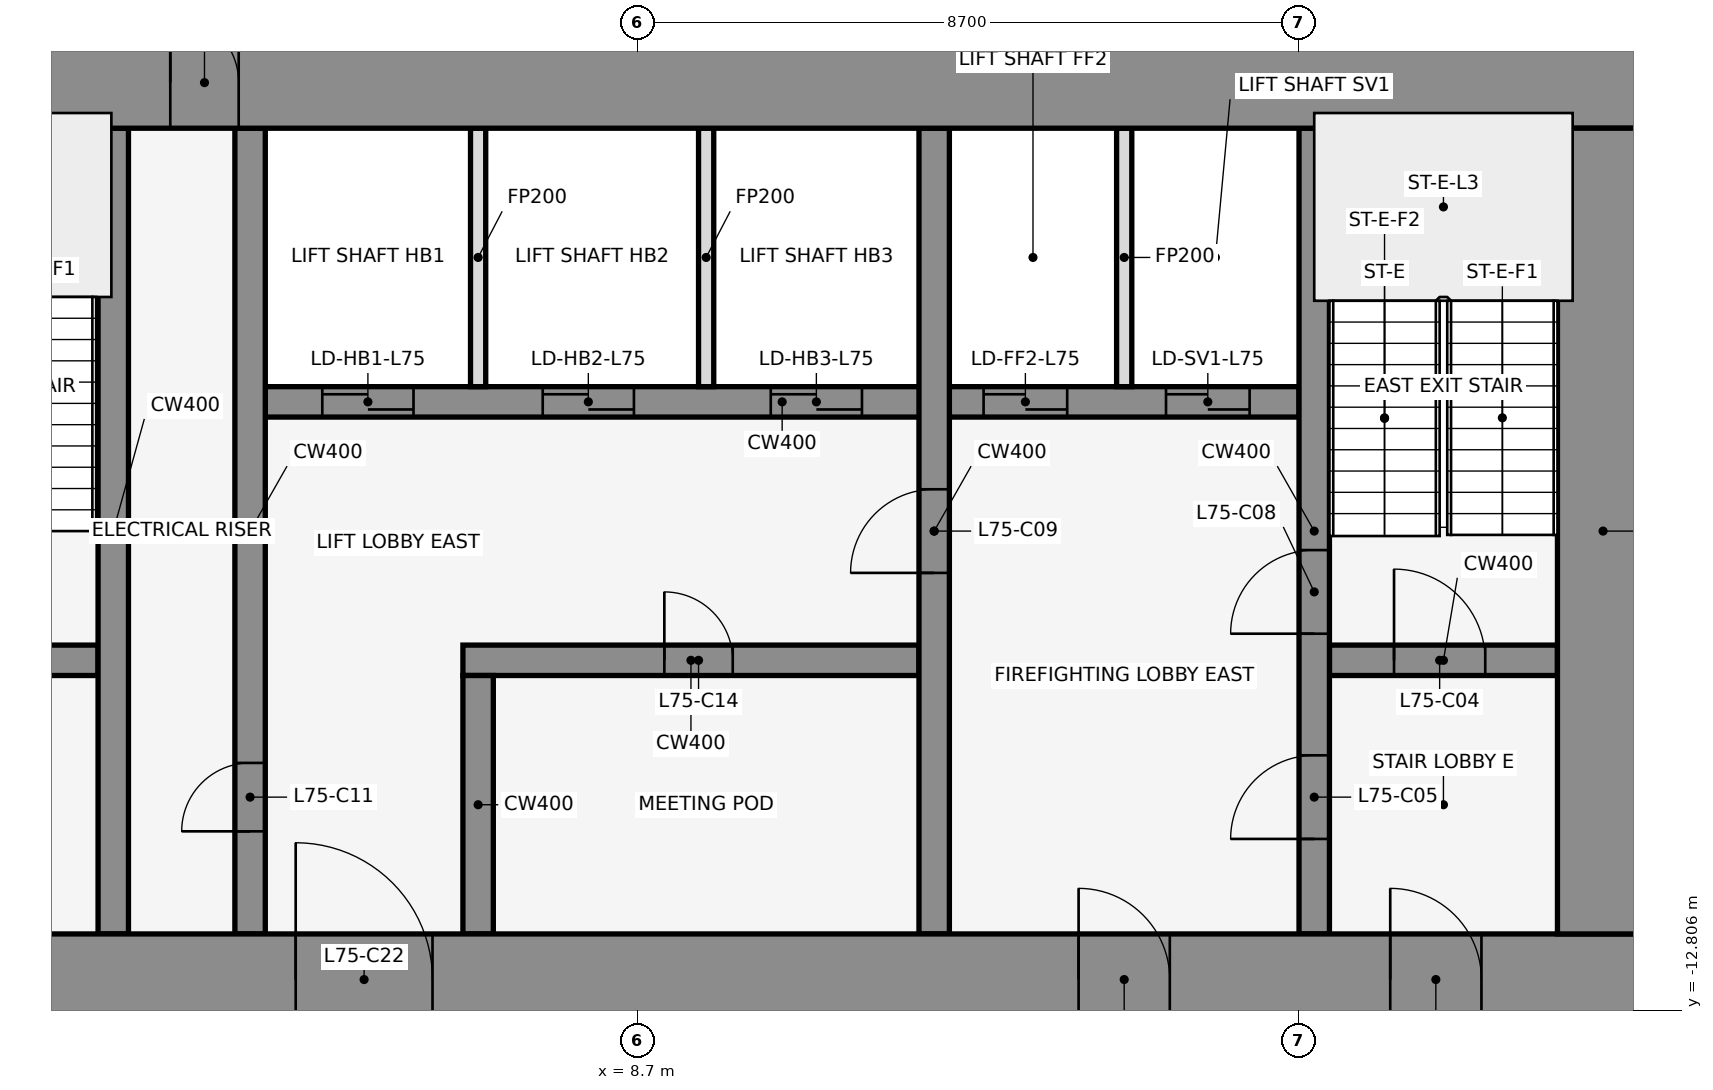
"""IFC4 building model, lengths in metres.
Left out: names, types, materials, properties, quantities, classifications, styles, units other than length and angle.
Written with IfcOpenShell. Run it as: python <this file> out.ifc"""

import sys

from ifc_helpers import new_model, si_unit, direction, frame, frame_2d, origin, place, context, subcontext, project, spatial, rectangle, extrude, element, fill, save


model = new_model("IFC4")
c1 = context("Model", 3, precision=1e-05, world=origin(), true_north=direction((0.0, 1.0)))
c2 = subcontext(c1, "Body", "Model", "MODEL_VIEW")
j1 = project(units=[si_unit("LENGTHUNIT", "METRE"), si_unit("PLANEANGLEUNIT", "RADIAN")], contexts=[c1])
p1 = place(None, origin())
s1 = spatial("IfcSite", under=j1, at=p1, CompositionType="ELEMENT")
p2 = place(p1, origin())
s2 = spatial("IfcBuilding", under=s1, at=p2, CompositionType="ELEMENT")
p3 = place(p2, frame((0.0, 0.0, 333.5)))
s3 = spatial("IfcBuildingStorey", under=s2, at=p3, CompositionType="ELEMENT", Elevation=333.5)
for number, where, z_axis, x_axis in (
    (1, (16.432, -0.105, 0.0), (0.0, 0.0, 1.0), (-0.84, 0.543, 0.0)),
    (2, (1.901, 1.08, 0.0), (0.0, 0.0, 1.0), (-0.84, -0.543, 0.0)),
):
    element("IfcWall", number, at=place(p3, frame(where, z_axis=z_axis, x_axis=x_axis)), inside=s3, PredefinedType="STANDARD", context=c2, shape_type="SweptSolid", body=[
        extrude(rectangle(XDim=2.183, YDim=0.25, at=frame_2d((1.091, 0.0))), origin(), (0.0, 0.0, 1.0), 4.35),
    ])
p4 = place(p3, frame((-1.6, -8.2, 0.0), z_axis=(0.0, 0.0, 1.0), x_axis=(1.0, 0.0, 0.0)))
e3 = element("IfcWall", 3, at=p4, inside=s3, PredefinedType="SHEAR", context=c2, shape_type="SweptSolid", body=[
    extrude(rectangle(XDim=3.2, YDim=0.4, at=frame_2d((1.6, 0.0))), origin(), (0.0, 0.0, 1.0), 4.5),
])
p5 = place(p4, frame((1.05, 0.0, 0.0)))
e4 = element("IfcOpeningElement", 4, at=p5, cuts=e3, PredefinedType="OPENING", context=c2, shape_type="SweptSolid", body=[
    extrude(rectangle(XDim=1.2, YDim=2.1, at=frame_2d((0.6, 1.05))), frame((0.0, 0.212, 0.0), z_axis=(0.0, -1.0, 0.0), x_axis=(1.0, 0.0, 0.0)), (0.0, 0.0, 1.0), 0.424),
])
p6 = place(p3, frame((6.4, -8.2, 0.0), z_axis=(0.0, 0.0, 1.0), x_axis=(1.0, 0.0, 0.0)))
e5 = element("IfcWall", 5, at=p6, inside=s3, PredefinedType="SHEAR", context=c2, shape_type="SweptSolid", body=[
    extrude(rectangle(XDim=6.0, YDim=0.4, at=frame_2d((3.0, 0.0))), origin(), (0.0, 0.0, 1.0), 4.5),
])
p7 = place(p6, frame((2.65, 0.0, 0.0)))
e6 = element("IfcOpeningElement", 6, at=p7, cuts=e5, PredefinedType="OPENING", context=c2, shape_type="SweptSolid", body=[
    extrude(rectangle(XDim=0.9, YDim=2.1, at=frame_2d((0.45, 1.05))), frame((0.0, 0.212, 0.0), z_axis=(0.0, -1.0, 0.0), x_axis=(1.0, 0.0, 0.0)), (0.0, 0.0, 1.0), 0.424),
])
p8 = place(p3, frame((17.8, -8.2, 0.0), z_axis=(0.0, 0.0, 1.0), x_axis=(1.0, 0.0, 0.0)))
e7 = element("IfcWall", 7, at=p8, inside=s3, PredefinedType="SHEAR", context=c2, shape_type="SweptSolid", body=[
    extrude(rectangle(XDim=3.0, YDim=0.4, at=frame_2d((1.5, 0.0))), origin(), (0.0, 0.0, 1.0), 4.5),
])
p9 = place(p8, frame((0.85, 0.0, 0.0)))
e8 = element("IfcOpeningElement", 8, at=p9, cuts=e7, PredefinedType="OPENING", context=c2, shape_type="SweptSolid", body=[
    extrude(rectangle(XDim=1.2, YDim=2.1, at=frame_2d((0.6, 1.05))), frame((0.0, 0.212, 0.0), z_axis=(0.0, -1.0, 0.0), x_axis=(1.0, 0.0, 0.0)), (0.0, 0.0, 1.0), 0.424),
])
p10 = place(p3, frame((3.8, -4.8, 0.0), z_axis=(0.0, 0.0, 1.0), x_axis=(1.0, 0.0, 0.0)))
e9 = element("IfcWall", 9, at=p10, inside=s3, PredefinedType="SHEAR", context=c2, shape_type="SweptSolid", body=[
    extrude(rectangle(XDim=13.6, YDim=0.4, at=frame_2d((6.8, 0.0))), origin(), (0.0, 0.0, 1.0), 4.5),
])
p11 = place(p10, frame((0.75, 0.0, 0.0)))
e10 = element("IfcOpeningElement", 10, at=p11, cuts=e9, PredefinedType="OPENING", context=c2, shape_type="SweptSolid", body=[
    extrude(rectangle(XDim=1.2, YDim=2.1, at=frame_2d((0.6, 1.05))), frame((0.0, 0.212, 0.0), z_axis=(0.0, -1.0, 0.0), x_axis=(1.0, 0.0, 0.0)), (0.0, 0.0, 1.0), 0.424),
])
p12 = place(p10, frame((3.65, 0.0, 0.0)))
e11 = element("IfcOpeningElement", 11, at=p12, cuts=e9, PredefinedType="OPENING", context=c2, shape_type="SweptSolid", body=[
    extrude(rectangle(XDim=1.2, YDim=2.1, at=frame_2d((0.6, 1.05))), frame((0.0, 0.212, 0.0), z_axis=(0.0, -1.0, 0.0), x_axis=(1.0, 0.0, 0.0)), (0.0, 0.0, 1.0), 0.424),
])
p13 = place(p10, frame((6.65, 0.0, 0.0)))
e12 = element("IfcOpeningElement", 12, at=p13, cuts=e9, PredefinedType="OPENING", context=c2, shape_type="SweptSolid", body=[
    extrude(rectangle(XDim=1.2, YDim=2.1, at=frame_2d((0.6, 1.05))), frame((0.0, 0.212, 0.0), z_axis=(0.0, -1.0, 0.0), x_axis=(1.0, 0.0, 0.0)), (0.0, 0.0, 1.0), 0.424),
])
p14 = place(p10, frame((9.45, 0.0, 0.0)))
e13 = element("IfcOpeningElement", 13, at=p14, cuts=e9, PredefinedType="OPENING", context=c2, shape_type="SweptSolid", body=[
    extrude(rectangle(XDim=1.1, YDim=2.1, at=frame_2d((0.55, 1.05))), frame((0.0, 0.212, 0.0), z_axis=(0.0, -1.0, 0.0), x_axis=(1.0, 0.0, 0.0)), (0.0, 0.0, 1.0), 0.424),
])
p15 = place(p10, frame((11.85, 0.0, 0.0)))
e14 = element("IfcOpeningElement", 14, at=p15, cuts=e9, PredefinedType="OPENING", context=c2, shape_type="SweptSolid", body=[
    extrude(rectangle(XDim=1.1, YDim=2.1, at=frame_2d((0.55, 1.05))), frame((0.0, 0.212, 0.0), z_axis=(0.0, -1.0, 0.0), x_axis=(1.0, 0.0, 0.0)), (0.0, 0.0, 1.0), 0.424),
])
p16 = place(p3, frame((1.8, -11.8, 0.0), z_axis=(0.0, 0.0, 1.0), x_axis=(0.0, 1.0, 0.0)))
e15 = element("IfcWall", 15, at=p16, inside=s3, PredefinedType="SHEAR", context=c2, shape_type="SweptSolid", body=[
    extrude(rectangle(XDim=10.6, YDim=0.4, at=frame_2d((5.3, 0.0))), origin(), (0.0, 0.0, 1.0), 4.5),
])
p17 = place(p3, frame((3.6, -11.8, 0.0), z_axis=(0.0, 0.0, 1.0), x_axis=(0.0, 1.0, 0.0)))
e16 = element("IfcWall", 16, at=p17, inside=s3, PredefinedType="SHEAR", context=c2, shape_type="SweptSolid", body=[
    extrude(rectangle(XDim=10.6, YDim=0.4, at=frame_2d((5.3, 0.0))), origin(), (0.0, 0.0, 1.0), 4.5),
])
p18 = place(p17, frame((1.35, 0.0, 0.0)))
e17 = element("IfcOpeningElement", 17, at=p18, cuts=e16, PredefinedType="OPENING", context=c2, shape_type="SweptSolid", body=[
    extrude(rectangle(XDim=0.9, YDim=2.1, at=frame_2d((0.45, 1.05))), frame((0.0, 0.212, 0.0), z_axis=(0.0, -1.0, 0.0), x_axis=(1.0, 0.0, 0.0)), (0.0, 0.0, 1.0), 0.424),
])
p19 = place(p3, frame((6.6, -11.8, 0.0), z_axis=(0.0, 0.0, 1.0), x_axis=(0.0, 1.0, 0.0)))
e18 = element("IfcWall", 18, at=p19, inside=s3, PredefinedType="SHEAR", context=c2, shape_type="SweptSolid", body=[
    extrude(rectangle(XDim=3.4, YDim=0.4, at=frame_2d((1.7, 0.0))), origin(), (0.0, 0.0, 1.0), 4.5),
])
for number, where, z_axis, x_axis in (
    (19, (6.6, -4.6, 0.0), (0.0, 0.0, 1.0), (0.0, 1.0, 0.0)),
    (20, (9.6, -4.6, 0.0), (0.0, 0.0, 1.0), (0.0, 1.0, 0.0)),
):
    element("IfcWall", number, at=place(p3, frame(where, z_axis=z_axis, x_axis=x_axis)), inside=s3, PredefinedType="PARTITIONING", context=c2, shape_type="SweptSolid", body=[
        extrude(rectangle(XDim=3.4, YDim=0.2, at=frame_2d((1.7, 0.0))), origin(), (0.0, 0.0, 1.0), 3.339),
    ])
p20 = place(p3, frame((12.6, -11.8, 0.0), z_axis=(0.0, 0.0, 1.0), x_axis=(0.0, 1.0, 0.0)))
e21 = element("IfcWall", 21, at=p20, inside=s3, PredefinedType="SHEAR", context=c2, shape_type="SweptSolid", body=[
    extrude(rectangle(XDim=10.6, YDim=0.4, at=frame_2d((5.3, 0.0))), origin(), (0.0, 0.0, 1.0), 4.5),
])
p21 = place(p20, frame((4.75, 0.0, 0.0)))
e22 = element("IfcOpeningElement", 22, at=p21, cuts=e21, PredefinedType="OPENING", context=c2, shape_type="SweptSolid", body=[
    extrude(rectangle(XDim=1.1, YDim=2.1, at=frame_2d((0.55, 1.05))), frame((0.0, 0.212, 0.0), z_axis=(0.0, -1.0, 0.0), x_axis=(1.0, 0.0, 0.0)), (0.0, 0.0, 1.0), 0.424),
])
p22 = place(p3, frame((15.1, -4.6, 0.0), z_axis=(0.0, 0.0, 1.0), x_axis=(0.0, 1.0, 0.0)))
e23 = element("IfcWall", 23, at=p22, inside=s3, PredefinedType="PARTITIONING", context=c2, shape_type="SweptSolid", body=[
    extrude(rectangle(XDim=3.4, YDim=0.2, at=frame_2d((1.7, 0.0))), origin(), (0.0, 0.0, 1.0), 3.339),
])
p23 = place(p3, frame((17.6, -11.8, 0.0), z_axis=(0.0, 0.0, 1.0), x_axis=(0.0, 1.0, 0.0)))
e24 = element("IfcWall", 24, at=p23, inside=s3, PredefinedType="SHEAR", context=c2, shape_type="SweptSolid", body=[
    extrude(rectangle(XDim=10.6, YDim=0.4, at=frame_2d((5.3, 0.0))), origin(), (0.0, 0.0, 1.0), 4.5),
])
p24 = place(p23, frame((1.25, 0.0, 0.0)))
e25 = element("IfcOpeningElement", 25, at=p24, cuts=e24, PredefinedType="OPENING", context=c2, shape_type="SweptSolid", body=[
    extrude(rectangle(XDim=1.1, YDim=2.1, at=frame_2d((0.55, 1.05))), frame((0.0, 0.212, 0.0), z_axis=(0.0, -1.0, 0.0), x_axis=(1.0, 0.0, 0.0)), (0.0, 0.0, 1.0), 0.424),
])
p25 = place(p23, frame((3.95, 0.0, 0.0)))
e26 = element("IfcOpeningElement", 26, at=p25, cuts=e24, PredefinedType="OPENING", context=c2, shape_type="SweptSolid", body=[
    extrude(rectangle(XDim=1.1, YDim=2.1, at=frame_2d((0.55, 1.05))), frame((0.0, 0.212, 0.0), z_axis=(0.0, -1.0, 0.0), x_axis=(1.0, 0.0, 0.0)), (0.0, 0.0, 1.0), 0.424),
])
p26 = place(p3, frame((-22.0, -0.6, 0.0), z_axis=(0.0, 0.0, 1.0), x_axis=(1.0, 0.0, 0.0)))
e27 = element("IfcWall", 27, at=p26, inside=s3, PredefinedType="SHEAR", context=c2, shape_type="SweptSolid", body=[
    extrude(rectangle(XDim=44.0, YDim=1.2, at=frame_2d((22.0, 0.0))), origin(), (0.0, 0.0, 1.0), 4.5),
])
p27 = place(p26, frame((18.55, 0.0, 0.0)))
e28 = element("IfcOpeningElement", 28, at=p27, cuts=e27, PredefinedType="OPENING", context=c2, shape_type="SweptSolid", body=[
    extrude(rectangle(XDim=0.9, YDim=2.1, at=frame_2d((0.45, 1.05))), frame((0.0, 0.612, 0.0), z_axis=(0.0, -1.0, 0.0), x_axis=(1.0, 0.0, 0.0)), (0.0, 0.0, 1.0), 1.224),
])
p28 = place(p26, frame((24.55, 0.0, 0.0)))
e29 = element("IfcOpeningElement", 29, at=p28, cuts=e27, PredefinedType="OPENING", context=c2, shape_type="SweptSolid", body=[
    extrude(rectangle(XDim=0.9, YDim=2.1, at=frame_2d((0.45, 1.05))), frame((0.0, 0.612, 0.0), z_axis=(0.0, -1.0, 0.0), x_axis=(1.0, 0.0, 0.0)), (0.0, 0.0, 1.0), 1.224),
])
p29 = place(p3, frame((-22.0, -12.4, 0.0), z_axis=(0.0, 0.0, 1.0), x_axis=(1.0, 0.0, 0.0)))
e30 = element("IfcWall", 30, at=p29, inside=s3, PredefinedType="SHEAR", context=c2, shape_type="SweptSolid", body=[
    extrude(rectangle(XDim=44.0, YDim=1.2, at=frame_2d((22.0, 0.0))), origin(), (0.0, 0.0, 1.0), 4.5),
])
p30 = place(p29, frame((2.2, 0.0, 0.0)))
e31 = element("IfcOpeningElement", 31, at=p30, cuts=e30, PredefinedType="OPENING", context=c2, shape_type="SweptSolid", body=[
    extrude(rectangle(XDim=1.2, YDim=2.1, at=frame_2d((0.6, 1.05))), frame((0.0, 0.612, 0.0), z_axis=(0.0, -1.0, 0.0), x_axis=(1.0, 0.0, 0.0)), (0.0, 0.0, 1.0), 1.224),
])
p31 = place(p29, frame((21.4, 0.0, 0.0)))
e32 = element("IfcOpeningElement", 32, at=p31, cuts=e30, PredefinedType="OPENING", context=c2, shape_type="SweptSolid", body=[
    extrude(rectangle(XDim=1.2, YDim=2.1, at=frame_2d((0.6, 1.05))), frame((0.0, 0.612, 0.0), z_axis=(0.0, -1.0, 0.0), x_axis=(1.0, 0.0, 0.0)), (0.0, 0.0, 1.0), 1.224),
])
p32 = place(p29, frame((40.6, 0.0, 0.0)))
e33 = element("IfcOpeningElement", 33, at=p32, cuts=e30, PredefinedType="OPENING", context=c2, shape_type="SweptSolid", body=[
    extrude(rectangle(XDim=1.2, YDim=2.1, at=frame_2d((0.6, 1.05))), frame((0.0, 0.612, 0.0), z_axis=(0.0, -1.0, 0.0), x_axis=(1.0, 0.0, 0.0)), (0.0, 0.0, 1.0), 1.224),
])
p33 = place(p29, frame((16.0, 0.0, 0.0)))
e34 = element("IfcOpeningElement", 34, at=p33, cuts=e30, PredefinedType="OPENING", context=c2, shape_type="SweptSolid", body=[
    extrude(rectangle(XDim=1.8, YDim=2.1, at=frame_2d((0.9, 1.05))), frame((0.0, 0.612, 0.0), z_axis=(0.0, -1.0, 0.0), x_axis=(1.0, 0.0, 0.0)), (0.0, 0.0, 1.0), 1.224),
])
p34 = place(p29, frame((6.3, 0.0, 0.0)))
e35 = element("IfcOpeningElement", 35, at=p34, cuts=e30, PredefinedType="OPENING", context=c2, shape_type="SweptSolid", body=[
    extrude(rectangle(XDim=1.2, YDim=2.1, at=frame_2d((0.6, 1.05))), frame((0.0, 0.612, 0.0), z_axis=(0.0, -1.0, 0.0), x_axis=(1.0, 0.0, 0.0)), (0.0, 0.0, 1.0), 1.224),
])
p35 = place(p29, frame((26.2, 0.0, 0.0)))
e36 = element("IfcOpeningElement", 36, at=p35, cuts=e30, PredefinedType="OPENING", context=c2, shape_type="SweptSolid", body=[
    extrude(rectangle(XDim=1.8, YDim=2.1, at=frame_2d((0.9, 1.05))), frame((0.0, 0.612, 0.0), z_axis=(0.0, -1.0, 0.0), x_axis=(1.0, 0.0, 0.0)), (0.0, 0.0, 1.0), 1.224),
])
p36 = place(p29, frame((36.5, 0.0, 0.0)))
e37 = element("IfcOpeningElement", 37, at=p36, cuts=e30, PredefinedType="OPENING", context=c2, shape_type="SweptSolid", body=[
    extrude(rectangle(XDim=1.2, YDim=2.1, at=frame_2d((0.6, 1.05))), frame((0.0, 0.612, 0.0), z_axis=(0.0, -1.0, 0.0), x_axis=(1.0, 0.0, 0.0)), (0.0, 0.0, 1.0), 1.224),
])
p37 = place(p3, frame((21.4, -11.8, 0.0), z_axis=(0.0, 0.0, 1.0), x_axis=(0.0, 1.0, 0.0)))
e38 = element("IfcWall", 38, at=p37, inside=s3, PredefinedType="SHEAR", context=c2, shape_type="SweptSolid", body=[
    extrude(rectangle(XDim=10.6, YDim=1.2, at=frame_2d((5.3, 0.0))), origin(), (0.0, 0.0, 1.0), 4.5),
])
p38 = place(p9, origin())
e39 = element("IfcDoor", 39, at=p38, inside=s3, OperationType="SINGLE_SWING_RIGHT", PredefinedType="DOOR", context=c2, shape_type="SweptSolid", body=[
    extrude(rectangle(XDim=1.2, YDim=2.1, at=frame_2d((0.6, 1.05))), frame((0.0, 0.025, 0.0), z_axis=(0.0, -1.0, 0.0), x_axis=(1.0, 0.0, 0.0)), (0.0, 0.0, 1.0), 0.05),
])
fill(e8, e39)
p39 = place(p24, origin())
e40 = element("IfcDoor", 40, at=p39, inside=s3, OperationType="SINGLE_SWING_LEFT", PredefinedType="DOOR", context=c2, shape_type="SweptSolid", body=[
    extrude(rectangle(XDim=1.1, YDim=2.1, at=frame_2d((0.55, 1.05))), frame((0.0, 0.025, 0.0), z_axis=(0.0, -1.0, 0.0), x_axis=(1.0, 0.0, 0.0)), (0.0, 0.0, 1.0), 0.05),
])
fill(e25, e40)
p40 = place(p11, origin())
e41 = element("IfcDoor", 41, at=p40, inside=s3, OperationType="DOUBLE_DOOR_SLIDING", PredefinedType="DOOR", context=c2, shape_type="SweptSolid", body=[
    extrude(rectangle(XDim=1.2, YDim=2.1, at=frame_2d((0.6, 1.05))), frame((0.0, 0.025, 0.0), z_axis=(0.0, -1.0, 0.0), x_axis=(1.0, 0.0, 0.0)), (0.0, 0.0, 1.0), 0.05),
])
fill(e10, e41)
p41 = place(p12, origin())
e42 = element("IfcDoor", 42, at=p41, inside=s3, OperationType="DOUBLE_DOOR_SLIDING", PredefinedType="DOOR", context=c2, shape_type="SweptSolid", body=[
    extrude(rectangle(XDim=1.2, YDim=2.1, at=frame_2d((0.6, 1.05))), frame((0.0, 0.025, 0.0), z_axis=(0.0, -1.0, 0.0), x_axis=(1.0, 0.0, 0.0)), (0.0, 0.0, 1.0), 0.05),
])
fill(e11, e42)
p42 = place(p13, origin())
e43 = element("IfcDoor", 43, at=p42, inside=s3, OperationType="DOUBLE_DOOR_SLIDING", PredefinedType="DOOR", context=c2, shape_type="SweptSolid", body=[
    extrude(rectangle(XDim=1.2, YDim=2.1, at=frame_2d((0.6, 1.05))), frame((0.0, 0.025, 0.0), z_axis=(0.0, -1.0, 0.0), x_axis=(1.0, 0.0, 0.0)), (0.0, 0.0, 1.0), 0.05),
])
fill(e12, e43)
p43 = place(p14, origin())
e44 = element("IfcDoor", 44, at=p43, inside=s3, OperationType="DOUBLE_DOOR_SLIDING", PredefinedType="DOOR", context=c2, shape_type="SweptSolid", body=[
    extrude(rectangle(XDim=1.1, YDim=2.1, at=frame_2d((0.55, 1.05))), frame((0.0, 0.025, 0.0), z_axis=(0.0, -1.0, 0.0), x_axis=(1.0, 0.0, 0.0)), (0.0, 0.0, 1.0), 0.05),
])
fill(e13, e44)
p44 = place(p15, origin())
e45 = element("IfcDoor", 45, at=p44, inside=s3, OperationType="DOUBLE_DOOR_SLIDING", PredefinedType="DOOR", context=c2, shape_type="SweptSolid", body=[
    extrude(rectangle(XDim=1.1, YDim=2.1, at=frame_2d((0.55, 1.05))), frame((0.0, 0.025, 0.0), z_axis=(0.0, -1.0, 0.0), x_axis=(1.0, 0.0, 0.0)), (0.0, 0.0, 1.0), 0.05),
])
fill(e14, e45)
p45 = place(p25, origin())
e46 = element("IfcDoor", 46, at=p45, inside=s3, OperationType="SINGLE_SWING_RIGHT", PredefinedType="DOOR", context=c2, shape_type="SweptSolid", body=[
    extrude(rectangle(XDim=1.1, YDim=2.1, at=frame_2d((0.55, 1.05))), frame((0.0, 0.025, 0.0), z_axis=(0.0, -1.0, 0.0), x_axis=(1.0, 0.0, 0.0)), (0.0, 0.0, 1.0), 0.05),
])
fill(e26, e46)
p46 = place(p21, frame((1.1, 0.0, 0.0), z_axis=(0.0, 0.0, 1.0), x_axis=(-1.0, 0.0, 0.0)))
e47 = element("IfcDoor", 47, at=p46, inside=s3, OperationType="SINGLE_SWING_RIGHT", PredefinedType="DOOR", context=c2, shape_type="SweptSolid", body=[
    extrude(rectangle(XDim=1.1, YDim=2.1, at=frame_2d((0.55, 1.05))), frame((0.0, 0.025, 0.0), z_axis=(0.0, -1.0, 0.0), x_axis=(1.0, 0.0, 0.0)), (0.0, 0.0, 1.0), 0.05),
])
fill(e22, e47)
p47 = place(p18, origin())
e48 = element("IfcDoor", 48, at=p47, inside=s3, OperationType="SINGLE_SWING_LEFT", PredefinedType="DOOR", context=c2, shape_type="SweptSolid", body=[
    extrude(rectangle(XDim=0.9, YDim=2.1, at=frame_2d((0.45, 1.05))), frame((0.0, 0.025, 0.0), z_axis=(0.0, -1.0, 0.0), x_axis=(1.0, 0.0, 0.0)), (0.0, 0.0, 1.0), 0.05),
])
fill(e17, e48)
p48 = place(p7, frame((0.9, 0.0, 0.0), z_axis=(0.0, 0.0, 1.0), x_axis=(-1.0, 0.0, 0.0)))
e49 = element("IfcDoor", 49, at=p48, inside=s3, OperationType="SINGLE_SWING_LEFT", PredefinedType="DOOR", context=c2, shape_type="SweptSolid", body=[
    extrude(rectangle(XDim=0.9, YDim=2.1, at=frame_2d((0.45, 1.05))), frame((0.0, 0.025, 0.0), z_axis=(0.0, -1.0, 0.0), x_axis=(1.0, 0.0, 0.0)), (0.0, 0.0, 1.0), 0.05),
])
fill(e6, e49)
p49 = place(p28, origin())
e50 = element("IfcDoor", 50, at=p49, inside=s3, OperationType="SINGLE_SWING_LEFT", PredefinedType="DOOR", context=c2, shape_type="SweptSolid", body=[
    extrude(rectangle(XDim=0.9, YDim=2.1, at=frame_2d((0.45, 1.05))), frame((0.0, 0.025, 0.0), z_axis=(0.0, -1.0, 0.0), x_axis=(1.0, 0.0, 0.0)), (0.0, 0.0, 1.0), 0.05),
])
fill(e29, e50)
p50 = place(p32, frame((1.2, 0.0, 0.0), z_axis=(0.0, 0.0, 1.0), x_axis=(-1.0, 0.0, 0.0)))
e51 = element("IfcDoor", 51, at=p50, inside=s3, OperationType="SINGLE_SWING_RIGHT", PredefinedType="DOOR", context=c2, shape_type="SweptSolid", body=[
    extrude(rectangle(XDim=1.2, YDim=2.1, at=frame_2d((0.6, 1.05))), frame((0.0, 0.025, 0.0), z_axis=(0.0, -1.0, 0.0), x_axis=(1.0, 0.0, 0.0)), (0.0, 0.0, 1.0), 0.05),
])
fill(e33, e51)
p51 = place(p35, origin())
e52 = element("IfcDoor", 52, at=p51, inside=s3, OperationType="SINGLE_SWING_LEFT", PredefinedType="DOOR", context=c2, shape_type="SweptSolid", body=[
    extrude(rectangle(XDim=1.8, YDim=2.1, at=frame_2d((0.9, 1.05))), frame((0.0, 0.025, 0.0), z_axis=(0.0, -1.0, 0.0), x_axis=(1.0, 0.0, 0.0)), (0.0, 0.0, 1.0), 0.05),
])
fill(e36, e52)
p52 = place(p36, frame((1.2, 0.0, 0.0), z_axis=(0.0, 0.0, 1.0), x_axis=(-1.0, 0.0, 0.0)))
e53 = element("IfcDoor", 53, at=p52, inside=s3, OperationType="SINGLE_SWING_RIGHT", PredefinedType="DOOR", context=c2, shape_type="SweptSolid", body=[
    extrude(rectangle(XDim=1.2, YDim=2.1, at=frame_2d((0.6, 1.05))), frame((0.0, 0.025, 0.0), z_axis=(0.0, -1.0, 0.0), x_axis=(1.0, 0.0, 0.0)), (0.0, 0.0, 1.0), 0.05),
])
fill(e37, e53)
save(model, sys.argv[1])
